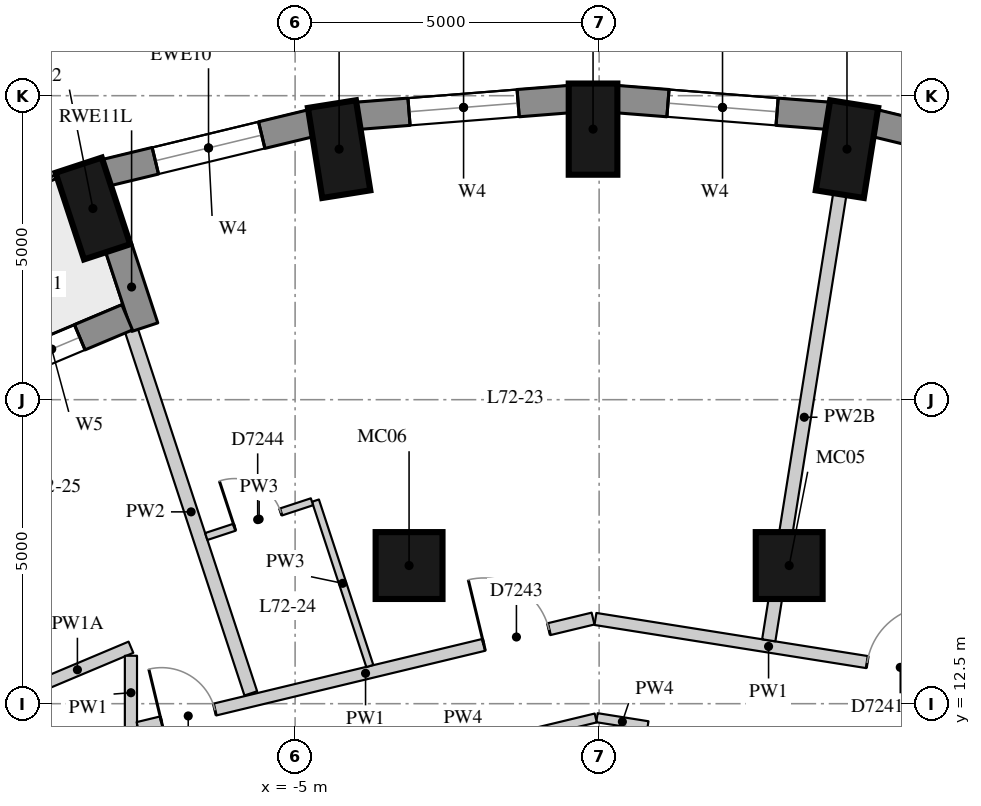
"""IFC4 building model, lengths in metres.
Left out: names, types, materials, properties, quantities, classifications, styles, units other than length and angle.
Written with IfcOpenShell. Run it as: python <this file> out.ifc"""

import sys

from ifc_helpers import new_model, si_unit, direction, frame, frame_2d, origin, origin_2d, place, context, subcontext, project, spatial, rectangle, extrude, element, fill, save


model = new_model("IFC4")
c1 = context("Model", 3, precision=1e-05, world=origin(), true_north=direction((0.0, 1.0)))
c2 = subcontext(c1, "Body", "Model", "MODEL_VIEW")
j1 = project(units=[si_unit("LENGTHUNIT", "METRE"), si_unit("PLANEANGLEUNIT", "RADIAN")], contexts=[c1])
p1 = place(None, origin())
s1 = spatial("IfcSite", under=j1, at=p1, CompositionType="ELEMENT")
p2 = place(p1, origin())
s2 = spatial("IfcBuilding", under=s1, at=p2, CompositionType="ELEMENT")
p3 = place(p2, frame((0.0, 0.0, 253.1)))
s3 = spatial("IfcBuildingStorey", under=s2, at=p3, CompositionType="ELEMENT", Elevation=253.1)
for number, where, z_axis, x_axis in (
    (1, (4.076, 21.621, 0.0), (0.0, 0.0, 1.0), (0.157, 0.988, 0.0)),
    (2, (-0.1, 21.95, 0.0), (0.0, 0.0, 1.0), (0.0, 1.0, 0.0)),
    (3, (-4.276, 21.621, 0.0), (0.0, 0.0, 1.0), (-0.157, 0.988, 0.0)),
    (4, (-8.326, 20.644, 0.0), (0.0, 0.0, 1.0), (-0.312, 0.95, 0.0)),
):
    element("IfcColumn", number, at=place(p3, frame(where, z_axis=z_axis, x_axis=x_axis)), inside=s3, PredefinedType="COLUMN", context=c2, shape_type="SweptSolid", body=[
        extrude(rectangle(XDim=1.5, YDim=0.8, at=origin_2d()), origin(), (0.0, 0.0, 1.0), 3.3),
    ])
for number, where, z_axis, x_axis in (
    (5, (3.126, 14.772, 0.0), (0.0, 0.0, 1.0), (1.0, 0.0, 0.0)),
    (6, (-3.126, 14.772, 0.0), (0.0, 0.0, 1.0), (1.0, 0.0, 0.0)),
):
    element("IfcColumn", number, at=place(p3, frame(where, z_axis=z_axis, x_axis=x_axis)), inside=s3, PredefinedType="COLUMN", context=c2, shape_type="SweptSolid", body=[
        extrude(rectangle(XDim=1.1, YDim=1.1, at=origin_2d()), origin(), (0.0, 0.0, 1.0), 3.3),
    ])
p4 = place(p3, frame((7.919, 21.232, 0.0), z_axis=(0.0, 0.0, 1.0), x_axis=(-0.972099278496, 0.23456980357, 0.0)))
e7 = element("IfcWall", 7, at=p4, inside=s3, PredefinedType="SOLIDWALL", context=c2, shape_type="SweptSolid", body=[
    extrude(rectangle(XDim=3.487, YDim=0.45, at=frame_2d((1.743, 0.0))), origin(), (0.0, 0.0, 1.0), 3.02),
])
p5 = place(p4, frame((0.843, 0.0, 0.4)))
e8 = element("IfcOpeningElement", 8, at=p5, cuts=e7, PredefinedType="OPENING", context=c2, shape_type="SweptSolid", body=[
    extrude(rectangle(XDim=1.8, YDim=1.75, at=frame_2d((0.9, 0.875))), frame((0.0, 0.235, 0.0), z_axis=(0.0, -1.0, 0.0), x_axis=(1.0, 0.0, 0.0)), (0.0, 0.0, 1.0), 0.47),
])
p6 = place(p3, frame((3.779, 22.169, 0.0), z_axis=(0.0, 0.0, 1.0), x_axis=(-0.996910775835, 0.078542377245, 0.0)))
e9 = element("IfcWall", 9, at=p6, inside=s3, PredefinedType="SOLIDWALL", context=c2, shape_type="SweptSolid", body=[
    extrude(rectangle(XDim=3.509, YDim=0.45, at=frame_2d((1.755, 0.0))), origin(), (0.0, 0.0, 1.0), 3.02),
])
p7 = place(p6, frame((0.855, 0.0, 0.4)))
e10 = element("IfcOpeningElement", 10, at=p7, cuts=e9, PredefinedType="OPENING", context=c2, shape_type="SweptSolid", body=[
    extrude(rectangle(XDim=1.8, YDim=1.75, at=frame_2d((0.9, 0.875))), frame((0.0, 0.235, 0.0), z_axis=(0.0, -1.0, 0.0), x_axis=(1.0, 0.0, 0.0)), (0.0, 0.0, 1.0), 0.47),
])
p8 = place(p3, frame((-0.48, 22.444, 0.0), z_axis=(0.0, 0.0, 1.0), x_axis=(-0.996910775835, -0.078542377245, 0.0)))
e11 = element("IfcWall", 11, at=p8, inside=s3, PredefinedType="SOLIDWALL", context=c2, shape_type="SweptSolid", body=[
    extrude(rectangle(XDim=3.509, YDim=0.45, at=frame_2d((1.755, 0.0))), origin(), (0.0, 0.0, 1.0), 3.02),
])
p9 = place(p8, frame((0.855, 0.0, 0.4)))
e12 = element("IfcOpeningElement", 12, at=p9, cuts=e11, PredefinedType="OPENING", context=c2, shape_type="SweptSolid", body=[
    extrude(rectangle(XDim=1.8, YDim=1.75, at=frame_2d((0.9, 0.875))), frame((0.0, 0.235, 0.0), z_axis=(0.0, -1.0, 0.0), x_axis=(1.0, 0.0, 0.0)), (0.0, 0.0, 1.0), 0.47),
])
p10 = place(p3, frame((-4.729, 22.05, 0.0), z_axis=(0.0, 0.0, 1.0), x_axis=(-0.972099278496, -0.23456980357, 0.0)))
e13 = element("IfcWall", 13, at=p10, inside=s3, PredefinedType="SOLIDWALL", context=c2, shape_type="SweptSolid", body=[
    extrude(rectangle(XDim=3.487, YDim=0.45, at=frame_2d((1.743, 0.0))), origin(), (0.0, 0.0, 1.0), 3.02),
])
p11 = place(p10, frame((0.843, 0.0, 0.4)))
e14 = element("IfcOpeningElement", 14, at=p11, cuts=e13, PredefinedType="OPENING", context=c2, shape_type="SweptSolid", body=[
    extrude(rectangle(XDim=1.8, YDim=1.75, at=frame_2d((0.9, 0.875))), frame((0.0, 0.235, 0.0), z_axis=(0.0, -1.0, 0.0), x_axis=(1.0, 0.0, 0.0)), (0.0, 0.0, 1.0), 0.47),
])
p12 = place(p3, frame((-7.906, 20.014, 0.0), z_axis=(0.0, 0.0, 1.0), x_axis=(0.312379684595, -0.949957332017, 0.0)))
e15 = element("IfcWall", 15, at=p12, inside=s3, PredefinedType="SOLIDWALL", context=c2, shape_type="SweptSolid", body=[
    extrude(rectangle(XDim=1.39, YDim=0.45, at=frame_2d((0.695, 0.0))), origin(), (0.0, 0.0, 1.0), 3.02),
])
p13 = place(p3, frame((-7.762, 18.855, 0.0), z_axis=(0.0, 0.0, 1.0), x_axis=(-0.921611451737, -0.388113813239, 0.0)))
e16 = element("IfcWall", 16, at=p13, inside=s3, PredefinedType="SOLIDWALL", context=c2, shape_type="SweptSolid", body=[
    extrude(rectangle(XDim=3.842, YDim=0.45, at=frame_2d((1.921, 0.0))), origin(), (0.0, 0.0, 1.0), 3.02),
])
p14 = place(p13, frame((0.846, 0.0, 0.4)))
e17 = element("IfcOpeningElement", 17, at=p14, cuts=e16, PredefinedType="OPENING", context=c2, shape_type="SweptSolid", body=[
    extrude(rectangle(XDim=1.0, YDim=1.75, at=frame_2d((0.5, 0.875))), frame((0.0, 0.235, 0.0), z_axis=(0.0, -1.0, 0.0), x_axis=(1.0, 0.0, 0.0)), (0.0, 0.0, 1.0), 0.47),
])
p15 = place(p13, frame((1.996, 0.0, 0.0)))
e18 = element("IfcOpeningElement", 18, at=p15, cuts=e16, PredefinedType="OPENING", context=c2, shape_type="SweptSolid", body=[
    extrude(rectangle(XDim=1.0, YDim=2.15, at=frame_2d((0.5, 1.075))), frame((0.0, 0.235, 0.0), z_axis=(0.0, -1.0, 0.0), x_axis=(1.0, 0.0, 0.0)), (0.0, 0.0, 1.0), 0.47),
])
p16 = place(p3, frame((-9.46, 12.687, 0.0), z_axis=(0.0, 0.0, 1.0), x_axis=(0.92164499827, 0.388034144328, 0.0)))
e19 = element("IfcWall", 19, at=p16, inside=s3, PredefinedType="PARTITIONING", context=c2, shape_type="SweptSolid", body=[
    extrude(rectangle(XDim=1.91, YDim=0.2, at=frame_2d((0.955, 0.0))), origin(), (0.0, 0.0, 1.0), 2.57),
])
p17 = place(p3, frame((-7.7, 13.288, 0.0), z_axis=(0.0, 0.0, 1.0), x_axis=(0.0, -1.0, 0.0)))
e20 = element("IfcWall", 20, at=p17, inside=s3, PredefinedType="PARTITIONING", context=c2, shape_type="SweptSolid", body=[
    extrude(rectangle(XDim=1.216, YDim=0.2, at=frame_2d((0.608, 0.0))), origin(), (0.0, 0.0, 1.0), 3.02),
])
p18 = place(p3, frame((-7.583, 12.1, 0.0), z_axis=(0.0, 0.0, 1.0), x_axis=(0.97226305798, 0.233890029903, 0.0)))
e21 = element("IfcWall", 21, at=p18, inside=s3, PredefinedType="PARTITIONING", context=c2, shape_type="SweptSolid", body=[
    extrude(rectangle(XDim=7.696, YDim=0.2, at=frame_2d((3.848, 0.0))), origin(), (0.0, 0.0, 1.0), 3.02),
])
p19 = place(p18, frame((5.85, 0.0, 0.0)))
e22 = element("IfcOpeningElement", 22, at=p19, cuts=e21, PredefinedType="OPENING", context=c2, shape_type="SweptSolid", body=[
    extrude(rectangle(XDim=1.1, YDim=2.1, at=frame_2d((0.55, 1.05))), frame((0.0, 0.11, 0.0), z_axis=(0.0, -1.0, 0.0), x_axis=(1.0, 0.0, 0.0)), (0.0, 0.0, 1.0), 0.22),
])
p20 = place(p18, frame((0.399, 0.0, 0.0)))
e23 = element("IfcOpeningElement", 23, at=p20, cuts=e21, PredefinedType="OPENING", context=c2, shape_type="SweptSolid", body=[
    extrude(rectangle(XDim=0.9, YDim=2.1, at=frame_2d((0.45, 1.05))), frame((0.0, 0.11, 0.0), z_axis=(0.0, -1.0, 0.0), x_axis=(1.0, 0.0, 0.0)), (0.0, 0.0, 1.0), 0.22),
])
p21 = place(p3, frame((-0.061, 13.894, 0.0), z_axis=(0.0, 0.0, 1.0), x_axis=(0.987623870558, -0.156840971383, 0.0)))
e24 = element("IfcWall", 24, at=p21, inside=s3, PredefinedType="PARTITIONING", context=c2, shape_type="SweptSolid", body=[
    extrude(rectangle(XDim=5.766, YDim=0.2, at=frame_2d((2.883, 0.0))), origin(), (0.0, 0.0, 1.0), 3.02),
])
p22 = place(p21, frame((4.526, 0.0, 0.0)))
e25 = element("IfcOpeningElement", 25, at=p22, cuts=e24, PredefinedType="OPENING", context=c2, shape_type="SweptSolid", body=[
    extrude(rectangle(XDim=1.1, YDim=2.1, at=frame_2d((0.55, 1.05))), frame((0.0, 0.11, 0.0), z_axis=(0.0, -1.0, 0.0), x_axis=(1.0, 0.0, 0.0)), (0.0, 0.0, 1.0), 0.22),
])
p23 = place(p3, frame((-0.036, 12.27, 0.0), z_axis=(0.0, 0.0, 1.0), x_axis=(0.987612834354, -0.156910450318, 0.0)))
e26 = element("IfcWall", 26, at=p23, inside=s3, PredefinedType="PARTITIONING", context=c2, shape_type="SweptSolid", body=[
    extrude(rectangle(XDim=0.846, YDim=0.15, at=frame_2d((0.423, 0.0))), origin(), (0.0, 0.0, 1.0), 3.02),
])
p24 = place(p3, frame((-4.422, 11.215, 0.0), z_axis=(0.0, 0.0, 1.0), x_axis=(0.972256385538, 0.233917764997, 0.0)))
e27 = element("IfcWall", 27, at=p24, inside=s3, PredefinedType="PARTITIONING", context=c2, shape_type="SweptSolid", body=[
    extrude(rectangle(XDim=4.491, YDim=0.15, at=frame_2d((2.246, 0.0))), origin(), (0.0, 0.0, 1.0), 3.02),
])
p25 = place(p3, frame((3.958, 20.88, 0.0), z_axis=(0.0, 0.0, 1.0), x_axis=(-0.157281826031, -0.987553759144, 0.0)))
e28 = element("IfcWall", 28, at=p25, inside=s3, PredefinedType="PARTITIONING", context=c2, shape_type="SweptSolid", body=[
    extrude(rectangle(XDim=7.431, YDim=0.22, at=frame_2d((3.715, 0.0))), origin(), (0.0, 0.0, 1.0), 2.57),
])
p26 = place(p3, frame((-7.692, 18.64, 0.0), z_axis=(0.0, 0.0, 1.0), x_axis=(0.312298025569, -0.949984180514, 0.0)))
e29 = element("IfcWall", 29, at=p26, inside=s3, PredefinedType="PARTITIONING", context=c2, shape_type="SweptSolid", body=[
    extrude(rectangle(XDim=6.285, YDim=0.22, at=frame_2d((3.143, 0.0))), origin(), (0.0, 0.0, 1.0), 3.02),
])
p27 = place(p3, frame((-3.771, 13.12, 0.0), z_axis=(0.0, 0.0, 1.0), x_axis=(-0.312336886671, 0.949971404425, 0.0)))
e30 = element("IfcWall", 30, at=p27, inside=s3, PredefinedType="PARTITIONING", context=c2, shape_type="SweptSolid", body=[
    extrude(rectangle(XDim=2.863, YDim=0.12, at=frame_2d((1.432, 0.0))), origin(), (0.0, 0.0, 1.0), 3.02),
])
p28 = place(p3, frame((-4.722, 15.821, 0.0), z_axis=(0.0, 0.0, 1.0), x_axis=(-0.949995576072, -0.312263359111, 0.0)))
e31 = element("IfcWall", 31, at=p28, inside=s3, PredefinedType="PARTITIONING", context=c2, shape_type="SweptSolid", body=[
    extrude(rectangle(XDim=1.83, YDim=0.12, at=frame_2d((0.915, 0.0))), origin(), (0.0, 0.0, 1.0), 3.02),
])
p29 = place(p28, frame((0.54, 0.0, 0.0)))
e32 = element("IfcOpeningElement", 32, at=p29, cuts=e31, PredefinedType="OPENING", context=c2, shape_type="SweptSolid", body=[
    extrude(rectangle(XDim=0.8, YDim=2.1, at=frame_2d((0.4, 1.05))), frame((0.0, 0.07, 0.0), z_axis=(0.0, -1.0, 0.0), x_axis=(1.0, 0.0, 0.0)), (0.0, 0.0, 1.0), 0.14),
])
p30 = place(p7, origin())
e33 = element("IfcWindow", 33, at=p30, inside=s3, PartitioningType="SINGLE_PANEL", PredefinedType="WINDOW", context=c2, shape_type="SweptSolid", body=[
    extrude(rectangle(XDim=1.8, YDim=1.75, at=frame_2d((0.9, 0.875))), frame((0.0, 0.035, 0.0), z_axis=(0.0, -1.0, 0.0), x_axis=(1.0, 0.0, 0.0)), (0.0, 0.0, 1.0), 0.06),
])
fill(e10, e33)
p31 = place(p9, origin())
e34 = element("IfcWindow", 34, at=p31, inside=s3, PartitioningType="SINGLE_PANEL", PredefinedType="WINDOW", context=c2, shape_type="SweptSolid", body=[
    extrude(rectangle(XDim=1.8, YDim=1.75, at=frame_2d((0.9, 0.875))), frame((0.0, 0.035, 0.0), z_axis=(0.0, -1.0, 0.0), x_axis=(1.0, 0.0, 0.0)), (0.0, 0.0, 1.0), 0.06),
])
fill(e12, e34)
p32 = place(p11, origin())
e35 = element("IfcWindow", 35, at=p32, inside=s3, PartitioningType="SINGLE_PANEL", PredefinedType="WINDOW", context=c2, shape_type="SweptSolid", body=[
    extrude(rectangle(XDim=1.8, YDim=1.75, at=frame_2d((0.9, 0.875))), frame((0.0, 0.035, 0.0), z_axis=(0.0, -1.0, 0.0), x_axis=(1.0, 0.0, 0.0)), (0.0, 0.0, 1.0), 0.06),
])
fill(e14, e35)
p33 = place(p14, origin())
e36 = element("IfcWindow", 36, at=p33, inside=s3, PartitioningType="SINGLE_PANEL", PredefinedType="WINDOW", context=c2, shape_type="SweptSolid", body=[
    extrude(rectangle(XDim=1.0, YDim=1.75, at=frame_2d((0.5, 0.875))), frame((0.0, 0.035, 0.0), z_axis=(0.0, -1.0, 0.0), x_axis=(1.0, 0.0, 0.0)), (0.0, 0.0, 1.0), 0.06),
])
fill(e17, e36)
p34 = place(p22, origin())
e37 = element("IfcDoor", 37, at=p34, inside=s3, OperationType="SINGLE_SWING_RIGHT", PredefinedType="DOOR", context=c2, shape_type="SweptSolid", body=[
    extrude(rectangle(XDim=1.1, YDim=2.1, at=frame_2d((0.55, 1.05))), frame((0.0, 0.025, 0.0), z_axis=(0.0, -1.0, 0.0), x_axis=(1.0, 0.0, 0.0)), (0.0, 0.0, 1.0), 0.05),
])
fill(e25, e37)
p35 = place(p19, origin())
e38 = element("IfcDoor", 38, at=p35, inside=s3, OperationType="SINGLE_SWING_LEFT", PredefinedType="DOOR", context=c2, shape_type="SweptSolid", body=[
    extrude(rectangle(XDim=1.1, YDim=2.1, at=frame_2d((0.55, 1.05))), frame((0.0, 0.025, 0.0), z_axis=(0.0, -1.0, 0.0), x_axis=(1.0, 0.0, 0.0)), (0.0, 0.0, 1.0), 0.05),
])
fill(e22, e38)
p36 = place(p29, origin())
e39 = element("IfcDoor", 39, at=p36, inside=s3, OperationType="SINGLE_SWING_LEFT", PredefinedType="DOOR", context=c2, shape_type="SweptSolid", body=[
    extrude(rectangle(XDim=0.8, YDim=2.1, at=frame_2d((0.4, 1.05))), frame((0.0, 0.025, 0.0), z_axis=(0.0, -1.0, 0.0), x_axis=(1.0, 0.0, 0.0)), (0.0, 0.0, 1.0), 0.05),
])
fill(e32, e39)
p37 = place(p20, origin())
e40 = element("IfcDoor", 40, at=p37, inside=s3, OperationType="SINGLE_SWING_LEFT", PredefinedType="DOOR", context=c2, shape_type="SweptSolid", body=[
    extrude(rectangle(XDim=0.9, YDim=2.1, at=frame_2d((0.45, 1.05))), frame((0.0, 0.025, 0.0), z_axis=(0.0, -1.0, 0.0), x_axis=(1.0, 0.0, 0.0)), (0.0, 0.0, 1.0), 0.05),
])
fill(e23, e40)
save(model, sys.argv[1])
